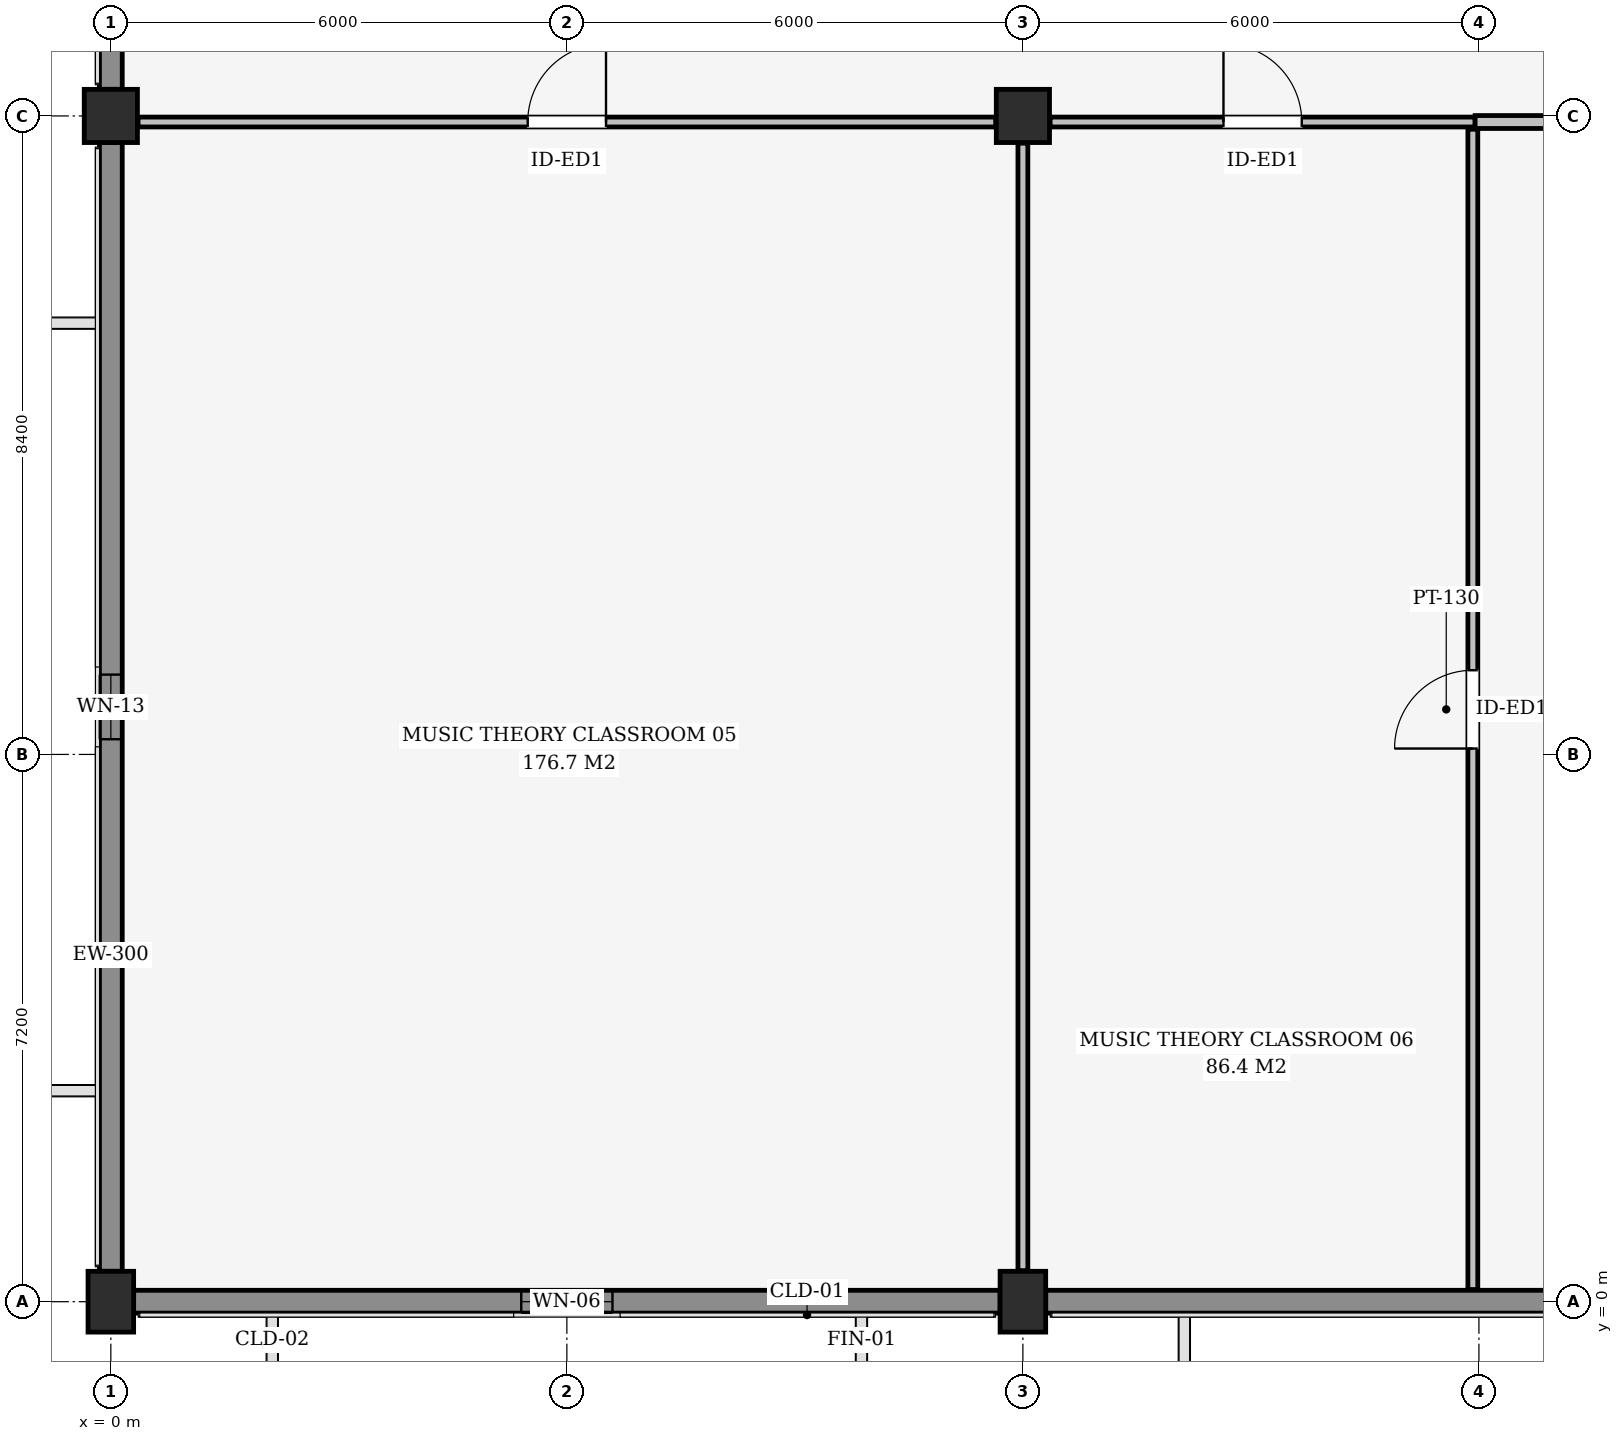
"""IFC4 building model, lengths in metres.
Left out: names, types, materials, properties, quantities, classifications, styles, units other than length and angle.
Written with IfcOpenShell. Run it as: python <this file> out.ifc"""

import sys

from ifc_helpers import new_model, si_unit, direction, frame, frame_2d, origin, origin_2d, place, context, subcontext, project, spatial, rectangle, extrude, element, fill, save


model = new_model("IFC4")
c1 = context("Model", 3, precision=1e-05, world=origin(), true_north=direction((0.0, 1.0)))
c2 = subcontext(c1, "Body", "Model", "MODEL_VIEW")
j1 = project(units=[si_unit("LENGTHUNIT", "METRE"), si_unit("PLANEANGLEUNIT", "RADIAN")], contexts=[c1])
p1 = place(None, origin())
s1 = spatial("IfcSite", under=j1, at=p1, CompositionType="ELEMENT")
p2 = place(p1, origin())
s2 = spatial("IfcBuilding", under=s1, at=p2, CompositionType="ELEMENT")
p3 = place(p2, frame((0.0, 0.0, 9.3)))
s3 = spatial("IfcBuildingStorey", under=s2, at=p3, CompositionType="ELEMENT", Elevation=9.3)
for number, where, z_axis, x_axis in (
    (1, (0.0, 0.0, 0.0), (0.0, 0.0, 1.0), (1.0, 0.0, 0.0)),
    (2, (12.0, 0.0, 0.0), (0.0, 0.0, 1.0), (1.0, 0.0, 0.0)),
):
    element("IfcColumn", number, at=place(p3, frame(where, z_axis=z_axis, x_axis=x_axis)), inside=s3, PredefinedType="COLUMN", context=c2, shape_type="SweptSolid", body=[
        extrude(rectangle(XDim=0.6, YDim=0.8, at=origin_2d()), origin(), (0.0, 0.0, 1.0), 4.5),
    ])
for number, where, z_axis, x_axis in (
    (3, (0.0, 15.6, 0.0), (0.0, 0.0, 1.0), (1.0, 0.0, 0.0)),
    (4, (12.0, 15.6, 0.0), (0.0, 0.0, 1.0), (1.0, 0.0, 0.0)),
):
    element("IfcColumn", number, at=place(p3, frame(where, z_axis=z_axis, x_axis=x_axis)), inside=s3, PredefinedType="COLUMN", context=c2, shape_type="SweptSolid", body=[
        extrude(rectangle(XDim=0.7, YDim=0.7, at=origin_2d()), origin(), (0.0, 0.0, 1.0), 4.5),
    ])
p4 = place(p3, frame((11.7, 0.0, 0.0), z_axis=(0.0, 0.0, 1.0), x_axis=(-1.0, 0.0, 0.0)))
e5 = element("IfcWall", 5, at=p4, inside=s3, PredefinedType="SOLIDWALL", context=c2, shape_type="SweptSolid", body=[
    extrude(rectangle(XDim=11.4, YDim=0.3, at=frame_2d((5.7, 0.0))), origin(), (0.0, 0.0, 1.0), 3.873),
])
p5 = place(p4, frame((5.1, 0.0, 0.85)))
e6 = element("IfcOpeningElement", 6, at=p5, cuts=e5, PredefinedType="OPENING", context=c2, shape_type="SweptSolid", body=[
    extrude(rectangle(XDim=1.2, YDim=1.5, at=frame_2d((0.6, 0.75))), frame((0.0, 0.16, 0.0), z_axis=(0.0, -1.0, 0.0), x_axis=(1.0, 0.0, 0.0)), (0.0, 0.0, 1.0), 0.32),
])
p6 = place(p3, frame((23.7, 0.0, 0.0), z_axis=(0.0, 0.0, 1.0), x_axis=(-1.0, 0.0, 0.0)))
e7 = element("IfcWall", 7, at=p6, inside=s3, PredefinedType="SOLIDWALL", context=c2, shape_type="SweptSolid", body=[
    extrude(rectangle(XDim=11.4, YDim=0.3, at=frame_2d((5.7, 0.0))), origin(), (0.0, 0.0, 1.0), 3.873),
])
p7 = place(p6, frame((2.067, 0.0, 0.85)))
e8 = element("IfcOpeningElement", 8, at=p7, cuts=e7, PredefinedType="OPENING", context=c2, shape_type="SweptSolid", body=[
    extrude(rectangle(XDim=2.25, YDim=1.95, at=frame_2d((1.125, 0.975))), frame((0.0, 0.16, 0.0), z_axis=(0.0, -1.0, 0.0), x_axis=(1.0, 0.0, 0.0)), (0.0, 0.0, 1.0), 0.32),
])
p8 = place(p3, frame((0.0, 0.4, 0.0), z_axis=(0.0, 0.0, 1.0), x_axis=(0.0, 1.0, 0.0)))
e9 = element("IfcWall", 9, at=p8, inside=s3, PredefinedType="SOLIDWALL", context=c2, shape_type="SweptSolid", body=[
    extrude(rectangle(XDim=14.85, YDim=0.3, at=frame_2d((7.425, 0.0))), origin(), (0.0, 0.0, 1.0), 3.634),
])
p9 = place(p8, frame((7.0, 0.0, 0.6)))
e10 = element("IfcOpeningElement", 10, at=p9, cuts=e9, PredefinedType="OPENING", context=c2, shape_type="SweptSolid", body=[
    extrude(rectangle(XDim=0.85, YDim=2.35, at=frame_2d((0.425, 1.175))), frame((0.0, 0.16, 0.0), z_axis=(0.0, -1.0, 0.0), x_axis=(1.0, 0.0, 0.0)), (0.0, 0.0, 1.0), 0.32),
])
p10 = place(p3, frame((0.0, 15.95, 0.0), z_axis=(0.0, 0.0, 1.0), x_axis=(0.0, 1.0, 0.0)))
e11 = element("IfcWall", 11, at=p10, inside=s3, PredefinedType="SOLIDWALL", context=c2, shape_type="SweptSolid", body=[
    extrude(rectangle(XDim=13.7, YDim=0.3, at=frame_2d((6.85, 0.0))), origin(), (0.0, 0.0, 1.0), 3.869),
])
p11 = place(p10, frame((8.364, 0.0, 0.6)))
e12 = element("IfcOpeningElement", 12, at=p11, cuts=e11, PredefinedType="OPENING", context=c2, shape_type="SweptSolid", body=[
    extrude(rectangle(XDim=3.0, YDim=2.1, at=frame_2d((1.5, 1.05))), frame((0.0, 0.16, 0.0), z_axis=(0.0, -1.0, 0.0), x_axis=(1.0, 0.0, 0.0)), (0.0, 0.0, 1.0), 0.32),
])
p12 = place(p3, frame((0.358, 15.52, 0.0), z_axis=(0.0, 0.0, 1.0), x_axis=(1.0, 0.0, 0.0)))
e13 = element("IfcWall", 13, at=p12, inside=s3, PredefinedType="PARTITIONING", context=c2, shape_type="SweptSolid", body=[
    extrude(rectangle(XDim=11.284, YDim=0.13, at=frame_2d((5.642, 0.0))), origin(), (0.0, 0.0, 1.0), 3.873),
])
p13 = place(p12, frame((5.127, 0.0, 0.0)))
e14 = element("IfcOpeningElement", 14, at=p13, cuts=e13, PredefinedType="OPENING", context=c2, shape_type="SweptSolid", body=[
    extrude(rectangle(XDim=1.03, YDim=2.18, at=frame_2d((0.515, 1.09))), frame((0.0, 0.075, 0.0), z_axis=(0.0, -1.0, 0.0), x_axis=(1.0, 0.0, 0.0)), (0.0, 0.0, 1.0), 0.15),
])
p14 = place(p3, frame((12.358, 15.52, 0.0), z_axis=(0.0, 0.0, 1.0), x_axis=(1.0, 0.0, 0.0)))
e15 = element("IfcWall", 15, at=p14, inside=s3, PredefinedType="PARTITIONING", context=c2, shape_type="SweptSolid", body=[
    extrude(rectangle(XDim=5.592, YDim=0.13, at=frame_2d((2.796, 0.0))), origin(), (0.0, 0.0, 1.0), 3.18),
])
p15 = place(p14, frame((2.281, 0.0, 0.0)))
e16 = element("IfcOpeningElement", 16, at=p15, cuts=e15, PredefinedType="OPENING", context=c2, shape_type="SweptSolid", body=[
    extrude(rectangle(XDim=1.03, YDim=2.18, at=frame_2d((0.515, 1.09))), frame((0.0, 0.075, 0.0), z_axis=(0.0, -1.0, 0.0), x_axis=(1.0, 0.0, 0.0)), (0.0, 0.0, 1.0), 0.15),
])
p16 = place(p3, frame((17.95, 15.52, 0.0), z_axis=(0.0, 0.0, 1.0), x_axis=(1.0, 0.0, 0.0)))
e17 = element("IfcWall", 17, at=p16, inside=s3, PredefinedType="PARTITIONING", context=c2, shape_type="SweptSolid", body=[
    extrude(rectangle(XDim=6.135, YDim=0.17, at=frame_2d((3.067, 0.0))), origin(), (0.0, 0.0, 1.0), 3.18),
])
p17 = place(p16, frame((2.458, 0.0, 0.0)))
e18 = element("IfcOpeningElement", 18, at=p17, cuts=e17, PredefinedType="OPENING", context=c2, shape_type="SweptSolid", body=[
    extrude(rectangle(XDim=1.22, YDim=2.18, at=frame_2d((0.61, 1.09))), frame((0.0, 0.095, 0.0), z_axis=(0.0, -1.0, 0.0), x_axis=(1.0, 0.0, 0.0)), (0.0, 0.0, 1.0), 0.19),
])
p18 = place(p3, frame((12.0, 0.408, 0.0), z_axis=(0.0, 0.0, 1.0), x_axis=(0.0, 1.0, 0.0)))
e19 = element("IfcWall", 19, at=p18, inside=s3, PredefinedType="PARTITIONING", context=c2, shape_type="SweptSolid", body=[
    extrude(rectangle(XDim=14.834, YDim=0.13, at=frame_2d((7.417, 0.0))), origin(), (0.0, 0.0, 1.0), 3.634),
])
p19 = place(p3, frame((17.92, 0.16, 0.0), z_axis=(0.0, 0.0, 1.0), x_axis=(0.0, 1.0, 0.0)))
e20 = element("IfcWall", 20, at=p19, inside=s3, PredefinedType="PARTITIONING", context=c2, shape_type="SweptSolid", body=[
    extrude(rectangle(XDim=15.265, YDim=0.13, at=frame_2d((7.633, 0.0))), origin(), (0.0, 0.0, 1.0), 4.5),
])
p20 = place(p19, frame((7.117, 0.0, 0.0)))
e21 = element("IfcOpeningElement", 21, at=p20, cuts=e20, PredefinedType="OPENING", context=c2, shape_type="SweptSolid", body=[
    extrude(rectangle(XDim=1.03, YDim=2.18, at=frame_2d((0.515, 1.09))), frame((0.0, 0.075, 0.0), z_axis=(0.0, -1.0, 0.0), x_axis=(1.0, 0.0, 0.0)), (0.0, 0.0, 1.0), 0.15),
])
p21 = place(p5, origin())
e22 = element("IfcWindow", 22, at=p21, inside=s3, PartitioningType="SINGLE_PANEL", PredefinedType="WINDOW", context=c2, shape_type="SweptSolid", body=[
    extrude(rectangle(XDim=1.2, YDim=1.5, at=frame_2d((0.6, 0.75))), frame((0.0, 0.03, 0.0), z_axis=(0.0, -1.0, 0.0), x_axis=(1.0, 0.0, 0.0)), (0.0, 0.0, 1.0), 0.06),
])
fill(e6, e22)
p22 = place(p9, origin())
e23 = element("IfcWindow", 23, at=p22, inside=s3, PartitioningType="SINGLE_PANEL", PredefinedType="WINDOW", context=c2, shape_type="SweptSolid", body=[
    extrude(rectangle(XDim=0.85, YDim=2.35, at=frame_2d((0.425, 1.175))), frame((0.0, 0.03, 0.0), z_axis=(0.0, -1.0, 0.0), x_axis=(1.0, 0.0, 0.0)), (0.0, 0.0, 1.0), 0.06),
])
fill(e10, e23)
p23 = place(p13, origin())
e24 = element("IfcDoor", 24, at=p23, inside=s3, OperationType="SINGLE_SWING_RIGHT", PredefinedType="DOOR", context=c2, shape_type="SweptSolid", body=[
    extrude(rectangle(XDim=1.03, YDim=2.18, at=frame_2d((0.515, 1.09))), frame((0.0, 0.025, 0.0), z_axis=(0.0, -1.0, 0.0), x_axis=(1.0, 0.0, 0.0)), (0.0, 0.0, 1.0), 0.05),
])
fill(e14, e24)
p24 = place(p15, origin())
e25 = element("IfcDoor", 25, at=p24, inside=s3, OperationType="SINGLE_SWING_LEFT", PredefinedType="DOOR", context=c2, shape_type="SweptSolid", body=[
    extrude(rectangle(XDim=1.03, YDim=2.18, at=frame_2d((0.515, 1.09))), frame((0.0, 0.025, 0.0), z_axis=(0.0, -1.0, 0.0), x_axis=(1.0, 0.0, 0.0)), (0.0, 0.0, 1.0), 0.05),
])
fill(e16, e25)
p25 = place(p20, origin())
e26 = element("IfcDoor", 26, at=p25, inside=s3, OperationType="SINGLE_SWING_LEFT", PredefinedType="DOOR", context=c2, shape_type="SweptSolid", body=[
    extrude(rectangle(XDim=1.03, YDim=2.18, at=frame_2d((0.515, 1.09))), frame((0.0, 0.025, 0.0), z_axis=(0.0, -1.0, 0.0), x_axis=(1.0, 0.0, 0.0)), (0.0, 0.0, 1.0), 0.05),
])
fill(e21, e26)
save(model, sys.argv[1])
